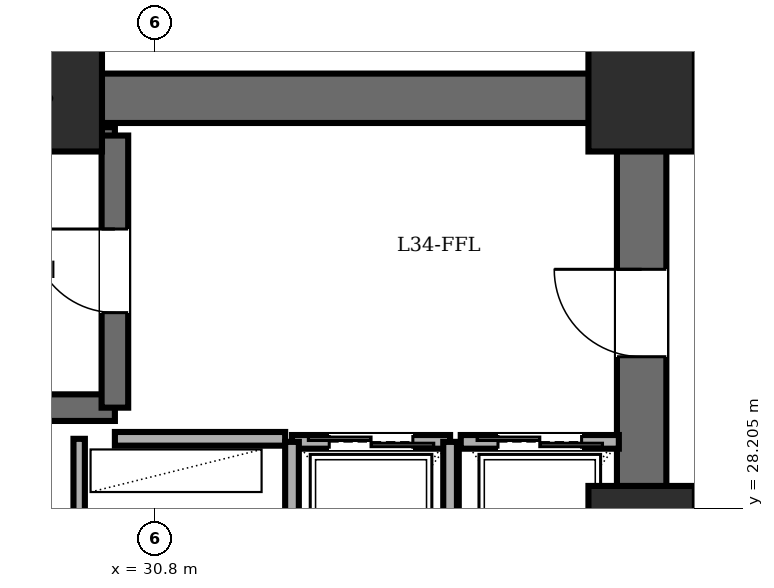
"""IFC4 building model, lengths in metres.
Left out: names, types, materials, properties, quantities, classifications, styles, units other than length and angle.
Written with IfcOpenShell. Run it as: python <this file> out.ifc"""

import sys

from ifc_helpers import new_model, si_unit, direction, frame, frame_2d, origin, origin_2d, place, context, subcontext, project, spatial, rectangle, extrude, element, fill, save


model = new_model("IFC4")
c1 = context("Model", 3, precision=1e-05, world=origin(), true_north=direction((0.0, 1.0)))
c2 = subcontext(c1, "Body", "Model", "MODEL_VIEW")
j1 = project(units=[si_unit("LENGTHUNIT", "METRE"), si_unit("PLANEANGLEUNIT", "RADIAN")], contexts=[c1])
p1 = place(None, origin())
s1 = spatial("IfcSite", under=j1, at=p1, CompositionType="ELEMENT")
p2 = place(p1, origin())
s2 = spatial("IfcBuilding", under=s1, at=p2, CompositionType="ELEMENT")
p3 = place(p2, frame((0.0, 0.0, 129.5)))
s3 = spatial("IfcBuildingStorey", under=s2, at=p3, CompositionType="ELEMENT", Elevation=129.5)
for number, where, z_axis, x_axis in (
    (1, (37.2, 27.8, 0.0), (0.0, 0.0, 1.0), (1.0, 0.0, 0.0)),
    (2, (37.2, 33.6, 0.0), (0.0, 0.0, 1.0), (1.0, 0.0, 0.0)),
    (3, (29.4, 33.6, 0.0), (0.0, 0.0, 1.0), (1.0, 0.0, 0.0)),
):
    element("IfcColumn", number, at=place(p3, frame(where, z_axis=z_axis, x_axis=x_axis)), inside=s3, PredefinedType="COLUMN", context=c2, shape_type="SweptSolid", body=[
        extrude(rectangle(XDim=1.4, YDim=1.4, at=origin_2d()), origin(), (0.0, 0.0, 1.0), 3.6),
    ])
p4 = place(p3, frame((21.6, 33.6, 0.0), z_axis=(0.0, 0.0, 1.0), x_axis=(1.0, 0.0, 0.0)))
e4 = element("IfcWall", 4, at=p4, inside=s3, PredefinedType="SHEAR", context=c2, shape_type="SweptSolid", body=[
    extrude(rectangle(XDim=15.6, YDim=0.65, at=frame_2d((7.8, 0.0))), origin(), (0.0, 0.0, 1.0), 3.36),
])
p5 = place(p3, frame((37.2, 14.4, 0.0), z_axis=(0.0, 0.0, 1.0), x_axis=(0.0, 1.0, 0.0)))
e5 = element("IfcWall", 5, at=p5, inside=s3, PredefinedType="SHEAR", context=c2, shape_type="SweptSolid", body=[
    extrude(rectangle(XDim=19.2, YDim=0.65, at=frame_2d((9.6, 0.0))), origin(), (0.0, 0.0, 1.0), 3.36),
])
p6 = place(p5, frame((15.8, 0.0, 0.0)))
e6 = element("IfcOpeningElement", 6, at=p6, cuts=e5, PredefinedType="OPENING", context=c2, shape_type="SweptSolid", body=[
    extrude(rectangle(XDim=1.15, YDim=2.15, at=frame_2d((0.575, 1.075))), frame((0.0, 0.335, 0.0), z_axis=(0.0, -1.0, 0.0), x_axis=(1.0, 0.0, 0.0)), (0.0, 0.0, 1.0), 0.67),
])
p7 = place(p5, frame((3.6, 0.0, 0.0)))
e7 = element("IfcOpeningElement", 7, at=p7, cuts=e5, PredefinedType="OPENING", context=c2, shape_type="SweptSolid", body=[
    extrude(rectangle(XDim=1.1, YDim=2.15, at=frame_2d((0.55, 1.075))), frame((0.0, 0.335, 0.0), z_axis=(0.0, -1.0, 0.0), x_axis=(1.0, 0.0, 0.0)), (0.0, 0.0, 1.0), 0.67),
])
p8 = place(p5, frame((8.6, 0.0, 0.0)))
e8 = element("IfcOpeningElement", 8, at=p8, cuts=e5, PredefinedType="OPENING", context=c2, shape_type="SweptSolid", body=[
    extrude(rectangle(XDim=1.3, YDim=2.2, at=frame_2d((0.65, 1.1))), frame((0.0, 0.335, 0.0), z_axis=(0.0, -1.0, 0.0), x_axis=(1.0, 0.0, 0.0)), (0.0, 0.0, 1.0), 0.67),
])
p9 = place(p3, frame((22.48, 29.53, 0.0), z_axis=(0.0, 0.0, 1.0), x_axis=(1.0, 0.0, 0.0)))
e9 = element("IfcWall", 9, at=p9, inside=s3, PredefinedType="SOLIDWALL", context=c2, shape_type="SweptSolid", body=[
    extrude(rectangle(XDim=7.79, YDim=0.35, at=frame_2d((3.895, 0.0))), origin(), (0.0, 0.0, 1.0), 3.36),
])
p10 = place(p3, frame((22.48, 33.11, 0.0), z_axis=(0.0, 0.0, 1.0), x_axis=(1.0, 0.0, 0.0)))
e10 = element("IfcWall", 10, at=p10, inside=s3, PredefinedType="PARTITIONING", context=c2, shape_type="SweptSolid", body=[
    extrude(rectangle(XDim=7.79, YDim=0.22, at=frame_2d((3.895, 0.0))), origin(), (0.0, 0.0, 1.0), 3.36),
])
p11 = place(p3, frame((30.27, 29.53, 0.0), z_axis=(0.0, 0.0, 1.0), x_axis=(0.0, 1.0, 0.0)))
e11 = element("IfcWall", 11, at=p11, inside=s3, PredefinedType="SOLIDWALL", context=c2, shape_type="SweptSolid", body=[
    extrude(rectangle(XDim=3.58, YDim=0.35, at=frame_2d((1.79, 0.0))), origin(), (0.0, 0.0, 1.0), 3.36),
])
p12 = place(p11, frame((1.25, 0.0, 0.0)))
e12 = element("IfcOpeningElement", 12, at=p12, cuts=e11, PredefinedType="OPENING", context=c2, shape_type="SweptSolid", body=[
    extrude(rectangle(XDim=1.1, YDim=2.15, at=frame_2d((0.55, 1.075))), frame((0.0, 0.185, 0.0), z_axis=(0.0, -1.0, 0.0), x_axis=(1.0, 0.0, 0.0)), (0.0, 0.0, 1.0), 0.37),
])
p13 = place(p3, frame((30.27, 29.12, 0.0), z_axis=(0.0, 0.0, 1.0), x_axis=(1.0, 0.0, 0.0)))
e13 = element("IfcWall", 13, at=p13, inside=s3, PredefinedType="PARTITIONING", context=c2, shape_type="SweptSolid", body=[
    extrude(rectangle(XDim=2.24, YDim=0.18, at=frame_2d((1.12, 0.0))), origin(), (0.0, 0.0, 1.0), 3.36),
])
p14 = place(p3, frame((29.8, 27.6, 0.0), z_axis=(0.0, 0.0, 1.0), x_axis=(0.0, 1.0, 0.0)))
e14 = element("IfcWall", 14, at=p14, inside=s3, PredefinedType="PARTITIONING", context=c2, shape_type="SweptSolid", body=[
    extrude(rectangle(XDim=1.52, YDim=0.15, at=frame_2d((0.76, 0.0))), origin(), (0.0, 0.0, 1.0), 3.36),
])
p15 = place(p3, frame((32.6, 29.08, 0.0), z_axis=(0.0, 0.0, 1.0), x_axis=(1.0, 0.0, 0.0)))
e15 = element("IfcWall", 15, at=p15, inside=s3, PredefinedType="PARTITIONING", context=c2, shape_type="SweptSolid", body=[
    extrude(rectangle(XDim=2.08, YDim=0.18, at=frame_2d((1.04, 0.0))), origin(), (0.0, 0.0, 1.0), 3.36),
])
p16 = place(p15, frame((0.49, 0.0, 0.0)))
e16 = element("IfcOpeningElement", 16, at=p16, cuts=e15, PredefinedType="OPENING", context=c2, shape_type="SweptSolid", body=[
    extrude(rectangle(XDim=1.1, YDim=2.2, at=frame_2d((0.55, 1.1))), frame((0.0, 0.1, 0.0), z_axis=(0.0, -1.0, 0.0), x_axis=(1.0, 0.0, 0.0)), (0.0, 0.0, 1.0), 0.2),
])
for number, where, z_axis, x_axis in (
    (17, (34.68, 26.35, 0.0), (0.0, 0.0, 1.0), (0.0, 1.0, 0.0)),
    (18, (32.6, 29.08, 0.0), (0.0, 0.0, 1.0), (0.0, -1.0, 0.0)),
):
    element("IfcWall", number, at=place(p3, frame(where, z_axis=z_axis, x_axis=x_axis)), inside=s3, PredefinedType="PARTITIONING", context=c2, shape_type="SweptSolid", body=[
        extrude(rectangle(XDim=2.73, YDim=0.18, at=frame_2d((1.365, 0.0))), origin(), (0.0, 0.0, 1.0), 3.36),
    ])
p17 = place(p3, frame((34.82, 29.08, 0.0), z_axis=(0.0, 0.0, 1.0), x_axis=(1.0, 0.0, 0.0)))
e19 = element("IfcWall", 19, at=p17, inside=s3, PredefinedType="PARTITIONING", context=c2, shape_type="SweptSolid", body=[
    extrude(rectangle(XDim=2.08, YDim=0.18, at=frame_2d((1.04, 0.0))), origin(), (0.0, 0.0, 1.0), 3.36),
])
p18 = place(p17, frame((0.49, 0.0, 0.0)))
e20 = element("IfcOpeningElement", 20, at=p18, cuts=e19, PredefinedType="OPENING", context=c2, shape_type="SweptSolid", body=[
    extrude(rectangle(XDim=1.1, YDim=2.2, at=frame_2d((0.55, 1.1))), frame((0.0, 0.1, 0.0), z_axis=(0.0, -1.0, 0.0), x_axis=(1.0, 0.0, 0.0)), (0.0, 0.0, 1.0), 0.2),
])
p19 = place(p12, origin())
e21 = element("IfcDoor", 21, at=p19, inside=s3, OperationType="SINGLE_SWING_RIGHT", PredefinedType="DOOR", context=c2, shape_type="SweptSolid", body=[
    extrude(rectangle(XDim=1.1, YDim=2.15, at=frame_2d((0.55, 1.075))), frame((0.0, 0.025, 0.0), z_axis=(0.0, -1.0, 0.0), x_axis=(1.0, 0.0, 0.0)), (0.0, 0.0, 1.0), 0.05),
])
fill(e12, e21)
p20 = place(p6, origin())
e22 = element("IfcDoor", 22, at=p20, inside=s3, OperationType="SINGLE_SWING_RIGHT", PredefinedType="DOOR", context=c2, shape_type="SweptSolid", body=[
    extrude(rectangle(XDim=1.15, YDim=2.15, at=frame_2d((0.575, 1.075))), frame((0.0, 0.025, 0.0), z_axis=(0.0, -1.0, 0.0), x_axis=(1.0, 0.0, 0.0)), (0.0, 0.0, 1.0), 0.05),
])
fill(e6, e22)
p21 = place(p16, origin())
e23 = element("IfcDoor", 23, at=p21, inside=s3, OperationType="DOUBLE_DOOR_SLIDING", PredefinedType="DOOR", context=c2, shape_type="SweptSolid", body=[
    extrude(rectangle(XDim=1.1, YDim=2.2, at=frame_2d((0.55, 1.1))), frame((0.0, 0.025, 0.0), z_axis=(0.0, -1.0, 0.0), x_axis=(1.0, 0.0, 0.0)), (0.0, 0.0, 1.0), 0.05),
])
fill(e16, e23)
p22 = place(p18, origin())
e24 = element("IfcDoor", 24, at=p22, inside=s3, OperationType="DOUBLE_DOOR_SLIDING", PredefinedType="DOOR", context=c2, shape_type="SweptSolid", body=[
    extrude(rectangle(XDim=1.1, YDim=2.2, at=frame_2d((0.55, 1.1))), frame((0.0, 0.025, 0.0), z_axis=(0.0, -1.0, 0.0), x_axis=(1.0, 0.0, 0.0)), (0.0, 0.0, 1.0), 0.05),
])
fill(e20, e24)
save(model, sys.argv[1])
